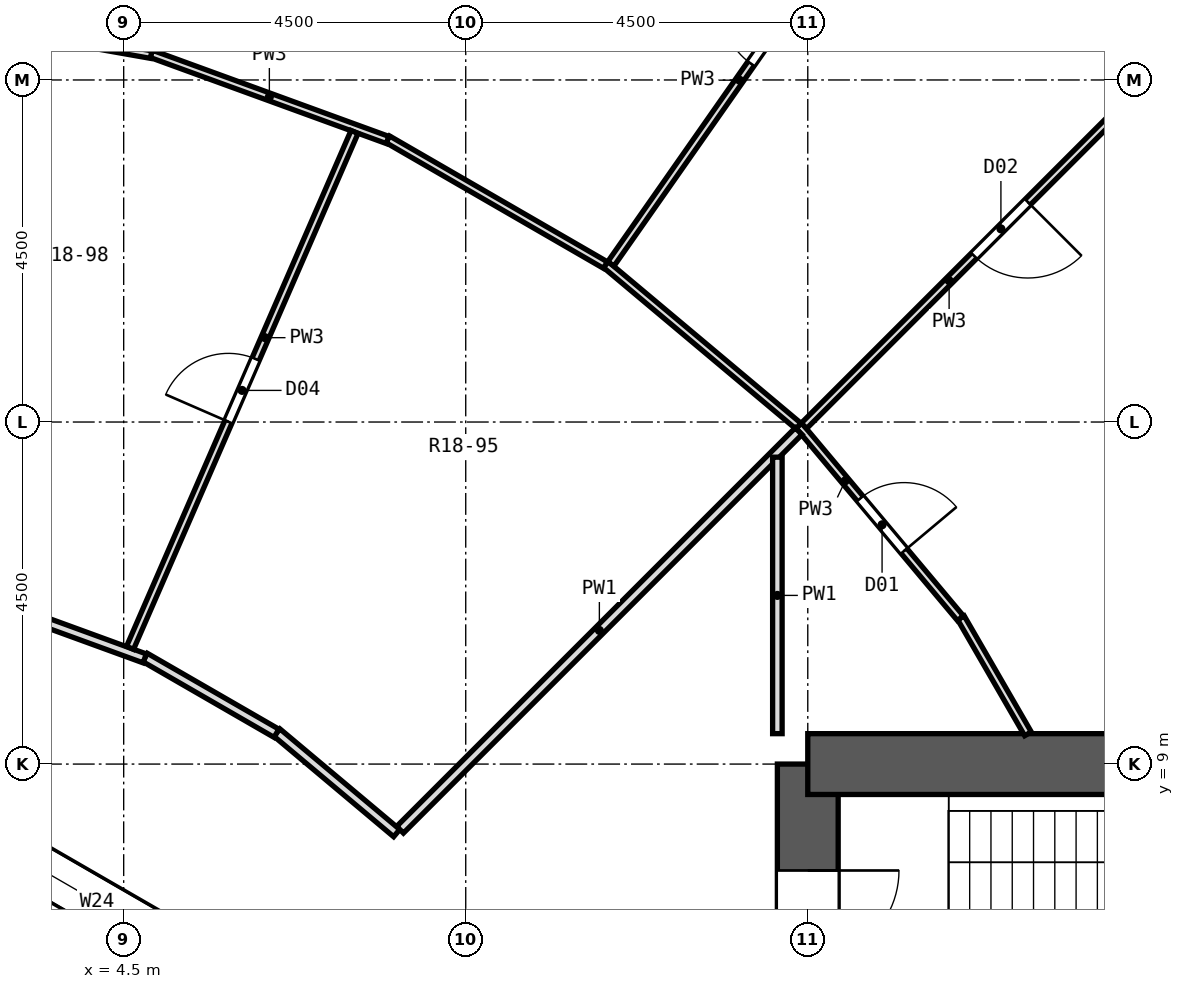
"""IFC4 building model, lengths in metres.
Left out: names, types, materials, properties, quantities, classifications, styles, units other than length and angle.
Written with IfcOpenShell. Run it as: python <this file> out.ifc"""

import sys

from ifc_helpers import new_model, si_unit, direction, frame, frame_2d, origin, place, context, subcontext, project, spatial, rectangle, extrude, element, fill, save


model = new_model("IFC4")
c1 = context("Model", 3, precision=1e-05, world=origin(), true_north=direction((0.0, 1.0)))
c2 = subcontext(c1, "Body", "Model", "MODEL_VIEW")
j1 = project(units=[si_unit("LENGTHUNIT", "METRE"), si_unit("PLANEANGLEUNIT", "RADIAN")], contexts=[c1])
p1 = place(None, origin())
s1 = spatial("IfcSite", under=j1, at=p1, CompositionType="ELEMENT")
p2 = place(p1, origin())
s2 = spatial("IfcBuilding", under=s1, at=p2, CompositionType="ELEMENT")
p3 = place(p2, frame((0.0, 0.0, 101.8)))
s3 = spatial("IfcBuildingStorey", under=s2, at=p3, CompositionType="ELEMENT", Elevation=101.8)
p4 = place(p3, frame((13.5, -9.0, 0.0), z_axis=(0.0, 0.0, 1.0), x_axis=(0.0, 1.0, 0.0)))
e1 = element("IfcWall", 1, at=p4, inside=s3, PredefinedType="SHEAR", context=c2, shape_type="SweptSolid", body=[
    extrude(rectangle(XDim=18.0, YDim=0.8, at=frame_2d((9.0, 0.0))), origin(), (0.0, 0.0, 1.0), 3.3),
])
p5 = place(p4, frame((15.4, 0.0, 0.0)))
e2 = element("IfcOpeningElement", 2, at=p5, cuts=e1, PredefinedType="OPENING", context=c2, shape_type="SweptSolid", body=[
    extrude(rectangle(XDim=1.2, YDim=2.1, at=frame_2d((0.6, 1.05))), frame((0.0, 0.412, 0.0), z_axis=(0.0, -1.0, 0.0), x_axis=(1.0, 0.0, 0.0)), (0.0, 0.0, 1.0), 0.824),
])
p6 = place(p4, frame((1.4, 0.0, 0.0)))
e3 = element("IfcOpeningElement", 3, at=p6, cuts=e1, PredefinedType="OPENING", context=c2, shape_type="SweptSolid", body=[
    extrude(rectangle(XDim=1.2, YDim=2.1, at=frame_2d((0.6, 1.05))), frame((0.0, 0.412, 0.0), z_axis=(0.0, -1.0, 0.0), x_axis=(1.0, 0.0, 0.0)), (0.0, 0.0, 1.0), 0.824),
])
p7 = place(p4, frame((7.5, 0.0, 0.0)))
e4 = element("IfcOpeningElement", 4, at=p7, cuts=e1, PredefinedType="OPENING", context=c2, shape_type="SweptSolid", body=[
    extrude(rectangle(XDim=3.0, YDim=2.4, at=frame_2d((1.5, 1.2))), frame((0.0, 0.412, 0.0), z_axis=(0.0, -1.0, 0.0), x_axis=(1.0, 0.0, 0.0)), (0.0, 0.0, 1.0), 0.824),
])
p8 = place(p3, frame((13.5, 9.0, 0.0), z_axis=(0.0, 0.0, 1.0), x_axis=(1.0, 0.0, 0.0)))
e5 = element("IfcWall", 5, at=p8, inside=s3, PredefinedType="SHEAR", context=c2, shape_type="SweptSolid", body=[
    extrude(rectangle(XDim=10.4, YDim=0.8, at=frame_2d((5.2, 0.0))), origin(), (0.0, 0.0, 1.0), 3.3),
])
p9 = place(p3, frame((5.773, 6.251, 0.0), z_axis=(0.0, 0.0, 1.0), x_axis=(-0.86604563398, 0.499964958637, 0.0)))
e6 = element("IfcWall", 6, at=p9, inside=s3, PredefinedType="SOLIDWALL", context=c2, shape_type="SweptSolid", body=[
    extrude(rectangle(XDim=3.747, YDim=0.6, at=frame_2d((1.874, 0.0))), origin(), (0.0, 0.0, 1.0), 2.8),
])
p10 = place(p9, frame((0.674, 0.0, 0.9)))
e7 = element("IfcOpeningElement", 7, at=p10, cuts=e6, PredefinedType="OPENING", context=c2, shape_type="SweptSolid", body=[
    extrude(rectangle(XDim=2.4, YDim=1.8, at=frame_2d((1.2, 0.9))), frame((0.0, 0.312, 0.0), z_axis=(0.0, -1.0, 0.0), x_axis=(1.0, 0.0, 0.0)), (0.0, 0.0, 1.0), 0.624),
])
p11 = place(p3, frame((15.515, 10.925, 0.0), z_axis=(0.0, 0.0, 1.0), x_axis=(0.500277597875, -0.865865073245, 0.0)))
e8 = element("IfcWall", 8, at=p11, inside=s3, PredefinedType="PARTITIONING", context=c2, shape_type="SweptSolid", body=[
    extrude(rectangle(XDim=1.764, YDim=0.1, at=frame_2d((0.882, 0.0))), origin(), (0.0, 0.0, 1.0), 2.8),
])
p12 = place(p3, frame((13.382, 13.454, 0.0), z_axis=(0.0, 0.0, 1.0), x_axis=(0.642584306873, -0.766214988473, 0.0)))
e9 = element("IfcWall", 9, at=p12, inside=s3, PredefinedType="PARTITIONING", context=c2, shape_type="SweptSolid", body=[
    extrude(rectangle(XDim=3.308, YDim=0.1, at=frame_2d((1.654, 0.0))), origin(), (0.0, 0.0, 1.0), 2.8),
])
p13 = place(p12, frame((1.254, 0.0, 0.0)))
e10 = element("IfcOpeningElement", 10, at=p13, cuts=e9, PredefinedType="OPENING", context=c2, shape_type="SweptSolid", body=[
    extrude(rectangle(XDim=0.9, YDim=2.1, at=frame_2d((0.45, 1.05))), frame((0.0, 0.062, 0.0), z_axis=(0.0, -1.0, 0.0), x_axis=(1.0, 0.0, 0.0)), (0.0, 0.0, 1.0), 0.124),
])
p14 = place(p3, frame((6.515, 9.415, 0.0), z_axis=(0.0, 0.0, 1.0), x_axis=(0.766097328455, -0.642724578131, 0.0)))
e11 = element("IfcWall", 11, at=p14, inside=s3, PredefinedType="PARTITIONING", context=c2, shape_type="SweptSolid", body=[
    extrude(rectangle(XDim=2.058, YDim=0.125, at=frame_2d((1.029, 0.0))), origin(), (0.0, 0.0, 1.0), 2.8),
])
p15 = place(p3, frame((10.842, 15.573, 0.0), z_axis=(0.0, 0.0, 1.0), x_axis=(0.76624546285, -0.642547967595, 0.0)))
e12 = element("IfcWall", 12, at=p15, inside=s3, PredefinedType="PARTITIONING", context=c2, shape_type="SweptSolid", body=[
    extrude(rectangle(XDim=3.308, YDim=0.1, at=frame_2d((1.654, 0.0))), origin(), (0.0, 0.0, 1.0), 2.8),
])
p16 = place(p3, frame((4.781, 10.403, 0.0), z_axis=(0.0, 0.0, 1.0), x_axis=(0.866173368732, -0.499743629573, 0.0)))
e13 = element("IfcWall", 13, at=p16, inside=s3, PredefinedType="PARTITIONING", context=c2, shape_type="SweptSolid", body=[
    extrude(rectangle(XDim=1.996, YDim=0.125, at=frame_2d((0.998, 0.0))), origin(), (0.0, 0.0, 1.0), 2.8),
])
p17 = place(p3, frame((7.974, 17.219, 0.0), z_axis=(0.0, 0.0, 1.0), x_axis=(0.865857256379, -0.500291126821, 0.0)))
e14 = element("IfcWall", 14, at=p17, inside=s3, PredefinedType="PARTITIONING", context=c2, shape_type="SweptSolid", body=[
    extrude(rectangle(XDim=3.307, YDim=0.1, at=frame_2d((1.654, 0.0))), origin(), (0.0, 0.0, 1.0), 2.8),
])
p18 = place(p3, frame((2.902, 11.073, 0.0), z_axis=(0.0, 0.0, 1.0), x_axis=(0.939557391744, -0.342391453777, 0.0)))
e15 = element("IfcWall", 15, at=p18, inside=s3, PredefinedType="PARTITIONING", context=c2, shape_type="SweptSolid", body=[
    extrude(rectangle(XDim=1.995, YDim=0.125, at=frame_2d((0.998, 0.0))), origin(), (0.0, 0.0, 1.0), 2.8),
])
p19 = place(p3, frame((4.863, 18.344, 0.0), z_axis=(0.0, 0.0, 1.0), x_axis=(0.939551875713, -0.342406589955, 0.0)))
e16 = element("IfcWall", 16, at=p19, inside=s3, PredefinedType="PARTITIONING", context=c2, shape_type="SweptSolid", body=[
    extrude(rectangle(XDim=3.308, YDim=0.1, at=frame_2d((1.654, 0.0))), origin(), (0.0, 0.0, 1.0), 2.8),
])
p20 = place(p3, frame((1.603, 18.908, 0.0), z_axis=(0.0, 0.0, 1.0), x_axis=(0.984831814927, -0.173511660439, 0.0)))
e17 = element("IfcWall", 17, at=p20, inside=s3, PredefinedType="PARTITIONING", context=c2, shape_type="SweptSolid", body=[
    extrude(rectangle(XDim=3.308, YDim=0.1, at=frame_2d((1.654, 0.0))), origin(), (0.0, 0.0, 1.0), 2.8),
])
p21 = place(p3, frame((13.45, 13.45, 0.0), z_axis=(0.0, 0.0, 1.0), x_axis=(0.707106781187, 0.707106781187, 0.0)))
e18 = element("IfcWall", 18, at=p21, inside=s3, PredefinedType="PARTITIONING", context=c2, shape_type="SweptSolid", body=[
    extrude(rectangle(XDim=6.643, YDim=0.1, at=frame_2d((3.322, 0.0))), origin(), (0.0, 0.0, 1.0), 2.8),
])
p22 = place(p21, frame((3.164, 0.0, 0.0)))
e19 = element("IfcOpeningElement", 19, at=p22, cuts=e18, PredefinedType="OPENING", context=c2, shape_type="SweptSolid", body=[
    extrude(rectangle(XDim=1.0, YDim=2.1, at=frame_2d((0.5, 1.05))), frame((0.0, 0.062, 0.0), z_axis=(0.0, -1.0, 0.0), x_axis=(1.0, 0.0, 0.0)), (0.0, 0.0, 1.0), 0.124),
])
p23 = place(p3, frame((8.136, 8.136, 0.0), z_axis=(0.0, 0.0, 1.0), x_axis=(0.707106781187, 0.707106781187, 0.0)))
e20 = element("IfcWall", 20, at=p23, inside=s3, PredefinedType="PARTITIONING", context=c2, shape_type="SweptSolid", body=[
    extrude(rectangle(XDim=7.415, YDim=0.125, at=frame_2d((3.708, 0.0))), origin(), (0.0, 0.0, 1.0), 2.8),
])
p24 = place(p3, frame((10.91, 15.581, 0.0), z_axis=(0.0, 0.0, 1.0), x_axis=(0.573558519574, 0.819164589459, 0.0)))
e21 = element("IfcWall", 21, at=p24, inside=s3, PredefinedType="PARTITIONING", context=c2, shape_type="SweptSolid", body=[
    extrude(rectangle(XDim=6.644, YDim=0.1, at=frame_2d((3.322, 0.0))), origin(), (0.0, 0.0, 1.0), 2.8),
])
p25 = place(p24, frame((3.215, 0.0, 0.0)))
e22 = element("IfcOpeningElement", 22, at=p25, cuts=e21, PredefinedType="OPENING", context=c2, shape_type="SweptSolid", body=[
    extrude(rectangle(XDim=0.9, YDim=2.1, at=frame_2d((0.45, 1.05))), frame((0.0, 0.062, 0.0), z_axis=(0.0, -1.0, 0.0), x_axis=(1.0, 0.0, 0.0)), (0.0, 0.0, 1.0), 0.124),
])
p26 = place(p3, frame((4.584, 10.529, 0.0), z_axis=(0.0, 0.0, 1.0), x_axis=(0.39900110087, 0.916950446592, 0.0)))
e23 = element("IfcWall", 23, at=p26, inside=s3, PredefinedType="PARTITIONING", context=c2, shape_type="SweptSolid", body=[
    extrude(rectangle(XDim=7.401, YDim=0.1, at=frame_2d((3.701, 0.0))), origin(), (0.0, 0.0, 1.0), 2.8),
])
p27 = place(p26, frame((3.243, 0.0, 0.0)))
e24 = element("IfcOpeningElement", 24, at=p27, cuts=e23, PredefinedType="OPENING", context=c2, shape_type="SweptSolid", body=[
    extrude(rectangle(XDim=0.9, YDim=2.1, at=frame_2d((0.45, 1.05))), frame((0.0, 0.062, 0.0), z_axis=(0.0, -1.0, 0.0), x_axis=(1.0, 0.0, 0.0)), (0.0, 0.0, 1.0), 0.124),
])
p28 = place(p3, frame((13.1, 9.4, 0.0), z_axis=(0.0, 0.0, 1.0), x_axis=(0.0, 1.0, 0.0)))
e25 = element("IfcWall", 25, at=p28, inside=s3, PredefinedType="PARTITIONING", context=c2, shape_type="SweptSolid", body=[
    extrude(rectangle(XDim=3.638, YDim=0.125, at=frame_2d((1.819, 0.0))), origin(), (0.0, 0.0, 1.0), 2.8),
])
p29 = place(p10, origin())
e26 = element("IfcWindow", 26, at=p29, inside=s3, PartitioningType="SINGLE_PANEL", PredefinedType="WINDOW", context=c2, shape_type="SweptSolid", body=[
    extrude(rectangle(XDim=2.4, YDim=1.8, at=frame_2d((1.2, 0.9))), frame((0.0, -0.12, 0.0), z_axis=(0.0, -1.0, 0.0), x_axis=(1.0, 0.0, 0.0)), (0.0, 0.0, 1.0), 0.06),
])
fill(e7, e26)
p30 = place(p13, origin())
e27 = element("IfcDoor", 27, at=p30, inside=s3, OperationType="SINGLE_SWING_RIGHT", PredefinedType="DOOR", context=c2, shape_type="SweptSolid", body=[
    extrude(rectangle(XDim=0.9, YDim=2.1, at=frame_2d((0.45, 1.05))), frame((0.0, 0.025, 0.0), z_axis=(0.0, -1.0, 0.0), x_axis=(1.0, 0.0, 0.0)), (0.0, 0.0, 1.0), 0.05),
])
fill(e10, e27)
p31 = place(p22, frame((1.0, 0.0, 0.0), z_axis=(0.0, 0.0, 1.0), x_axis=(-1.0, 0.0, 0.0)))
e28 = element("IfcDoor", 28, at=p31, inside=s3, OperationType="SINGLE_SWING_LEFT", PredefinedType="DOOR", context=c2, shape_type="SweptSolid", body=[
    extrude(rectangle(XDim=1.0, YDim=2.1, at=frame_2d((0.5, 1.05))), frame((0.0, 0.025, 0.0), z_axis=(0.0, -1.0, 0.0), x_axis=(1.0, 0.0, 0.0)), (0.0, 0.0, 1.0), 0.05),
])
fill(e19, e28)
p32 = place(p25, origin())
e29 = element("IfcDoor", 29, at=p32, inside=s3, OperationType="SINGLE_SWING_RIGHT", PredefinedType="DOOR", context=c2, shape_type="SweptSolid", body=[
    extrude(rectangle(XDim=0.9, YDim=2.1, at=frame_2d((0.45, 1.05))), frame((0.0, 0.025, 0.0), z_axis=(0.0, -1.0, 0.0), x_axis=(1.0, 0.0, 0.0)), (0.0, 0.0, 1.0), 0.05),
])
fill(e22, e29)
p33 = place(p27, origin())
e30 = element("IfcDoor", 30, at=p33, inside=s3, OperationType="SINGLE_SWING_LEFT", PredefinedType="DOOR", context=c2, shape_type="SweptSolid", body=[
    extrude(rectangle(XDim=0.9, YDim=2.1, at=frame_2d((0.45, 1.05))), frame((0.0, 0.025, 0.0), z_axis=(0.0, -1.0, 0.0), x_axis=(1.0, 0.0, 0.0)), (0.0, 0.0, 1.0), 0.05),
])
fill(e24, e30)
p34 = place(p5, frame((1.2, 0.0, 0.0), z_axis=(0.0, 0.0, 1.0), x_axis=(-1.0, 0.0, 0.0)))
e31 = element("IfcDoor", 31, at=p34, inside=s3, OperationType="SINGLE_SWING_LEFT", PredefinedType="DOOR", context=c2, shape_type="SweptSolid", body=[
    extrude(rectangle(XDim=1.2, YDim=2.1, at=frame_2d((0.6, 1.05))), frame((0.0, 0.025, 0.0), z_axis=(0.0, -1.0, 0.0), x_axis=(1.0, 0.0, 0.0)), (0.0, 0.0, 1.0), 0.05),
])
fill(e2, e31)
save(model, sys.argv[1])
